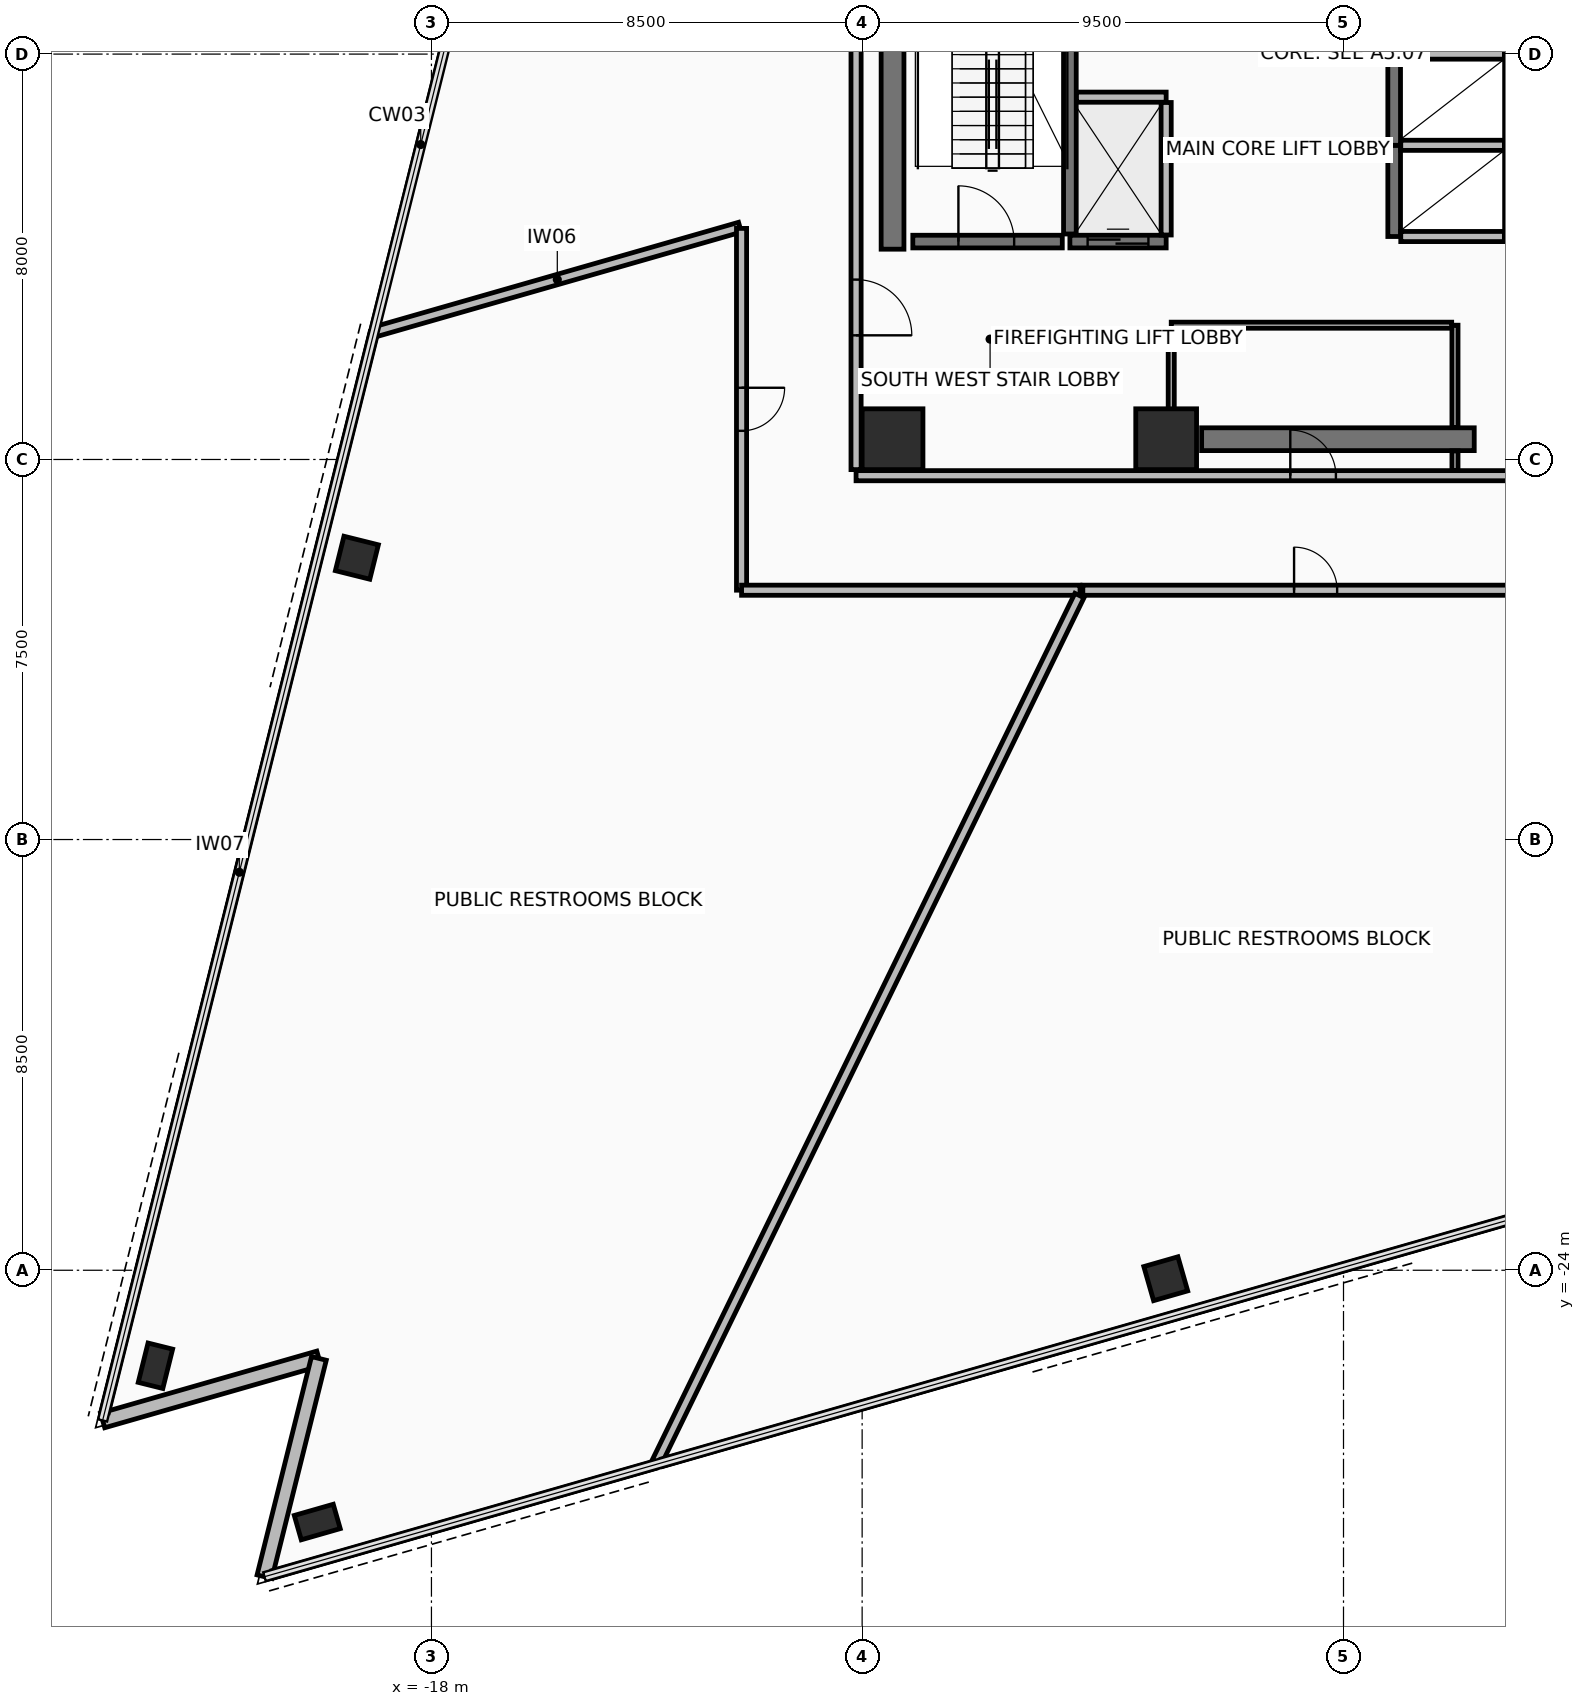
"""IFC4 building model, lengths in metres.
Left out: names, types, materials, properties, quantities, classifications, styles, units other than length and angle.
Written with IfcOpenShell. Run it as: python <this file> out.ifc"""

import sys

from ifc_helpers import new_model, si_unit, direction, frame, frame_2d, origin, origin_2d, place, context, subcontext, project, spatial, rectangle, hollow_rectangle, extrude, element, fill, save


model = new_model("IFC4")
c1 = context("Model", 3, precision=1e-05, world=origin(), true_north=direction((0.0, 1.0)))
c2 = subcontext(c1, "Body", "Model", "MODEL_VIEW")
j1 = project(units=[si_unit("LENGTHUNIT", "METRE"), si_unit("PLANEANGLEUNIT", "RADIAN")], contexts=[c1])
p1 = place(None, origin())
s1 = spatial("IfcSite", under=j1, at=p1, CompositionType="ELEMENT")
p2 = place(p1, origin())
s2 = spatial("IfcBuilding", under=s1, at=p2, CompositionType="ELEMENT")
p3 = place(p2, frame((0.0, 0.0, 86.1)))
s3 = spatial("IfcBuildingStorey", under=s2, at=p3, CompositionType="ELEMENT", Elevation=86.1)
for number, where, z_axis, x_axis in (
    (1, (-8.9, -7.6, 0.0), (0.0, 0.0, 1.0), (1.0, 0.0, 0.0)),
    (2, (-3.5, -7.6, 0.0), (0.0, 0.0, 1.0), (1.0, 0.0, 0.0)),
):
    element("IfcColumn", number, at=place(p3, frame(where, z_axis=z_axis, x_axis=x_axis)), inside=s3, PredefinedType="COLUMN", context=c2, shape_type="SweptSolid", body=[
        extrude(rectangle(XDim=1.2, YDim=1.2, at=origin_2d()), origin(), (0.0, 0.0, 1.0), 3.6),
    ])
p4 = place(p3, frame((-19.472, -9.939, 0.0), z_axis=(0.0, 0.0, 1.0), x_axis=(0.2419218956, 0.970295726276, 0.0)))
e3 = element("IfcColumn", 3, at=p4, inside=s3, PredefinedType="COLUMN", context=c2, shape_type="SweptSolid", body=[
    extrude(hollow_rectangle(XDim=0.7, YDim=0.7, WallThickness=0.04, at=origin_2d()), origin(), (0.0, 0.0, 1.0), 3.6),
])
for number, where, z_axis, x_axis in (
    (4, (-23.447, -25.885, 0.0), (0.0, 0.0, 1.0), (0.242, 0.97, 0.0)),
    (5, (-20.253, -28.969, 0.0), (0.0, 0.0, 1.0), (0.961, 0.276, 0.0)),
):
    element("IfcColumn", number, at=place(p3, frame(where, z_axis=z_axis, x_axis=x_axis)), inside=s3, PredefinedType="COLUMN", context=c2, shape_type="SweptSolid", body=[
        extrude(hollow_rectangle(XDim=0.5, YDim=0.8, WallThickness=0.04, at=origin_2d()), origin(), (0.0, 0.0, 1.0), 3.6),
    ])
p5 = place(p3, frame((-3.508, -24.167, -0.19), z_axis=(0.0, 0.0, 1.0), x_axis=(0.961261695938, 0.275637355817, 0.0)))
e6 = element("IfcColumn", 6, at=p5, inside=s3, PredefinedType="COLUMN", context=c2, shape_type="SweptSolid", body=[
    extrude(hollow_rectangle(XDim=0.7, YDim=0.7, WallThickness=0.04, at=origin_2d()), origin(), (0.0, 0.0, 1.0), 3.79),
])
p6 = place(p3, frame((-24.489, -26.964, 0.0), z_axis=(0.0, 0.0, 1.0), x_axis=(0.961259988927, 0.275643308803, 0.0)))
e7 = element("IfcWall", 7, at=p6, inside=s3, PredefinedType="STANDARD", context=c2, shape_type="SweptSolid", body=[
    extrude(rectangle(XDim=4.44, YDim=0.3, at=frame_2d((2.22, 0.0))), origin(), (0.0, 0.0, 1.0), 2.605),
])
p7 = place(p3, frame((-20.221, -25.74, 0.0), z_axis=(0.0, 0.0, 1.0), x_axis=(-0.241940431812, -0.970291104491, 0.0)))
e8 = element("IfcWall", 8, at=p7, inside=s3, PredefinedType="STANDARD", context=c2, shape_type="SweptSolid", body=[
    extrude(rectangle(XDim=4.44, YDim=0.3, at=frame_2d((2.22, 0.0))), origin(), (0.0, 0.0, 1.0), 2.605),
])
p8 = place(p3, frame((-2.8, -7.6, 0.0), z_axis=(0.0, 0.0, 1.0), x_axis=(1.0, 0.0, 0.0)))
e9 = element("IfcWall", 9, at=p8, inside=s3, PredefinedType="SHEAR", context=c2, shape_type="SweptSolid", body=[
    extrude(rectangle(XDim=5.38, YDim=0.45, at=frame_2d((2.69, 0.0))), origin(), (0.0, 0.0, 1.0), 3.41),
])
p9 = place(p3, frame((-8.9, -3.85, 0.0), z_axis=(0.0, 0.0, 1.0), x_axis=(0.0, 1.0, 0.0)))
e10 = element("IfcWall", 10, at=p9, inside=s3, PredefinedType="SHEAR", context=c2, shape_type="SweptSolid", body=[
    extrude(rectangle(XDim=10.7, YDim=0.45, at=frame_2d((5.35, 0.0))), origin(), (0.0, 0.0, 1.0), 3.41),
])
p10 = place(p3, frame((-9.62, -8.32, 0.0), z_axis=(0.0, 0.0, 1.0), x_axis=(1.0, 0.0, 0.0)))
e11 = element("IfcWall", 11, at=p10, inside=s3, PredefinedType="PARTITIONING", context=c2, shape_type="SweptSolid", body=[
    extrude(rectangle(XDim=19.24, YDim=0.2, at=frame_2d((9.62, 0.0))), origin(), (0.0, 0.0, 1.0), 2.805),
])
p11 = place(p10, frame((8.57, 0.0, 0.0)))
e12 = element("IfcOpeningElement", 12, at=p11, cuts=e11, PredefinedType="OPENING", context=c2, shape_type="SweptSolid", body=[
    extrude(rectangle(XDim=0.9, YDim=2.1, at=frame_2d((0.45, 1.05))), frame((0.0, 0.11, 0.0), z_axis=(0.0, -1.0, 0.0), x_axis=(1.0, 0.0, 0.0)), (0.0, 0.0, 1.0), 0.22),
])
p12 = place(p10, frame((14.045, 0.0, 0.0)))
e13 = element("IfcOpeningElement", 13, at=p12, cuts=e11, PredefinedType="OPENING", context=c2, shape_type="SweptSolid", body=[
    extrude(rectangle(XDim=0.9, YDim=2.1, at=frame_2d((0.45, 1.05))), frame((0.0, 0.11, 0.0), z_axis=(0.0, -1.0, 0.0), x_axis=(1.0, 0.0, 0.0)), (0.0, 0.0, 1.0), 0.22),
])
p13 = place(p10, frame((15.995, 0.0, 0.0)))
e14 = element("IfcOpeningElement", 14, at=p13, cuts=e11, PredefinedType="OPENING", context=c2, shape_type="SweptSolid", body=[
    extrude(rectangle(XDim=0.9, YDim=2.1, at=frame_2d((0.45, 1.05))), frame((0.0, 0.11, 0.0), z_axis=(0.0, -1.0, 0.0), x_axis=(1.0, 0.0, 0.0)), (0.0, 0.0, 1.0), 0.22),
])
p14 = place(p3, frame((-9.62, 8.2, 0.0), z_axis=(0.0, 0.0, 1.0), x_axis=(0.0, -1.0, 0.0)))
e15 = element("IfcWall", 15, at=p14, inside=s3, PredefinedType="PARTITIONING", context=c2, shape_type="SweptSolid", body=[
    extrude(rectangle(XDim=16.4, YDim=0.2, at=frame_2d((8.2, 0.0))), origin(), (0.0, 0.0, 1.0), 2.805),
])
p15 = place(p14, frame((12.65, 0.0, 0.0)))
e16 = element("IfcOpeningElement", 16, at=p15, cuts=e15, PredefinedType="OPENING", context=c2, shape_type="SweptSolid", body=[
    extrude(rectangle(XDim=1.1, YDim=2.15, at=frame_2d((0.55, 1.075))), frame((0.0, 0.11, 0.0), z_axis=(0.0, -1.0, 0.0), x_axis=(1.0, 0.0, 0.0)), (0.0, 0.0, 1.0), 0.22),
])
p16 = place(p3, frame((-5.4, -3.55, 0.0), z_axis=(0.0, 0.0, 1.0), x_axis=(0.0, 1.0, 0.0)))
e17 = element("IfcWall", 17, at=p16, inside=s3, PredefinedType="SHEAR", context=c2, shape_type="SweptSolid", body=[
    extrude(rectangle(XDim=7.3, YDim=0.25, at=frame_2d((3.65, 0.0))), origin(), (0.0, 0.0, 1.0), 3.41),
])
p17 = place(p3, frame((-8.5, -3.7, 0.0), z_axis=(0.0, 0.0, 1.0), x_axis=(1.0, 0.0, 0.0)))
e18 = element("IfcWall", 18, at=p17, inside=s3, PredefinedType="SHEAR", context=c2, shape_type="SweptSolid", body=[
    extrude(rectangle(XDim=2.95, YDim=0.25, at=frame_2d((1.475, 0.0))), origin(), (0.0, 0.0, 1.0), 3.41),
])
p18 = place(p17, frame((0.9, 0.0, 0.0)))
e19 = element("IfcOpeningElement", 19, at=p18, cuts=e18, PredefinedType="OPENING", context=c2, shape_type="SweptSolid", body=[
    extrude(rectangle(XDim=1.1, YDim=2.15, at=frame_2d((0.55, 1.075))), frame((0.0, 0.135, 0.0), z_axis=(0.0, -1.0, 0.0), x_axis=(1.0, 0.0, 0.0)), (0.0, 0.0, 1.0), 0.27),
])
p19 = place(p3, frame((1.0, -3.6, 0.0), z_axis=(0.0, 0.0, 1.0), x_axis=(0.0, 1.0, 0.0)))
e20 = element("IfcWall", 20, at=p19, inside=s3, PredefinedType="SHEAR", context=c2, shape_type="SweptSolid", body=[
    extrude(rectangle(XDim=1.8, YDim=0.25, at=frame_2d((0.9, 0.0))), origin(), (0.0, 0.0, 1.0), 3.41),
])
p20 = place(p3, frame((3.28, -3.6, 0.0), z_axis=(0.0, 0.0, 1.0), x_axis=(0.0, 1.0, 0.0)))
e21 = element("IfcWall", 21, at=p20, inside=s3, PredefinedType="PARTITIONING", context=c2, shape_type="SweptSolid", body=[
    extrude(rectangle(XDim=1.8, YDim=0.2, at=frame_2d((0.9, 0.0))), origin(), (0.0, 0.0, 1.0), 3.41),
])
for number, where, z_axis, x_axis in (
    (22, (1.13, -3.6, 0.0), (0.0, 0.0, 1.0), (1.0, 0.0, 0.0)),
    (23, (1.13, -1.8, 0.0), (0.0, 0.0, 1.0), (1.0, 0.0, 0.0)),
):
    element("IfcWall", number, at=place(p3, frame(where, z_axis=z_axis, x_axis=x_axis)), inside=s3, PredefinedType="PARTITIONING", context=c2, shape_type="SweptSolid", body=[
        extrude(rectangle(XDim=2.045, YDim=0.2, at=frame_2d((1.022, 0.0))), origin(), (0.0, 0.0, 1.0), 3.41),
    ])
p21 = place(p3, frame((1.0, -1.8, 0.0), z_axis=(0.0, 0.0, 1.0), x_axis=(0.0, 1.0, 0.0)))
e24 = element("IfcWall", 24, at=p21, inside=s3, PredefinedType="SHEAR", context=c2, shape_type="SweptSolid", body=[
    extrude(rectangle(XDim=1.8, YDim=0.25, at=frame_2d((0.9, 0.0))), origin(), (0.0, 0.0, 1.0), 3.41),
])
p22 = place(p3, frame((3.28, -1.8, 0.0), z_axis=(0.0, 0.0, 1.0), x_axis=(0.0, 1.0, 0.0)))
e25 = element("IfcWall", 25, at=p22, inside=s3, PredefinedType="PARTITIONING", context=c2, shape_type="SweptSolid", body=[
    extrude(rectangle(XDim=1.8, YDim=0.2, at=frame_2d((0.9, 0.0))), origin(), (0.0, 0.0, 1.0), 3.41),
])
p23 = place(p3, frame((1.13, 0.0, 0.0), z_axis=(0.0, 0.0, 1.0), x_axis=(1.0, 0.0, 0.0)))
e26 = element("IfcWall", 26, at=p23, inside=s3, PredefinedType="PARTITIONING", context=c2, shape_type="SweptSolid", body=[
    extrude(rectangle(XDim=2.045, YDim=0.2, at=frame_2d((1.022, 0.0))), origin(), (0.0, 0.0, 1.0), 3.41),
])
p24 = place(p3, frame((1.0, 0.0, 0.0), z_axis=(0.0, 0.0, 1.0), x_axis=(0.0, 1.0, 0.0)))
e27 = element("IfcWall", 27, at=p24, inside=s3, PredefinedType="SHEAR", context=c2, shape_type="SweptSolid", body=[
    extrude(rectangle(XDim=1.8, YDim=0.25, at=frame_2d((0.9, 0.0))), origin(), (0.0, 0.0, 1.0), 3.41),
])
p25 = place(p3, frame((3.28, 0.0, 0.0), z_axis=(0.0, 0.0, 1.0), x_axis=(0.0, 1.0, 0.0)))
e28 = element("IfcWall", 28, at=p25, inside=s3, PredefinedType="PARTITIONING", context=c2, shape_type="SweptSolid", body=[
    extrude(rectangle(XDim=1.8, YDim=0.2, at=frame_2d((0.9, 0.0))), origin(), (0.0, 0.0, 1.0), 3.41),
])
p26 = place(p3, frame((-5.4, -3.7, 0.0), z_axis=(0.0, 0.0, 1.0), x_axis=(1.0, 0.0, 0.0)))
e29 = element("IfcWall", 29, at=p26, inside=s3, PredefinedType="SHEAR", context=c2, shape_type="SweptSolid", body=[
    extrude(rectangle(XDim=1.9, YDim=0.25, at=frame_2d((0.95, 0.0))), origin(), (0.0, 0.0, 1.0), 3.41),
])
p27 = place(p26, frame((0.35, 0.0, 0.0)))
e30 = element("IfcOpeningElement", 30, at=p27, cuts=e29, PredefinedType="OPENING", context=c2, shape_type="SweptSolid", body=[
    extrude(rectangle(XDim=1.2, YDim=2.2, at=frame_2d((0.6, 1.1))), frame((0.0, 0.135, 0.0), z_axis=(0.0, -1.0, 0.0), x_axis=(1.0, 0.0, 0.0)), (0.0, 0.0, 1.0), 0.27),
])
p28 = place(p3, frame((-5.27, -0.85, 0.0), z_axis=(0.0, 0.0, 1.0), x_axis=(1.0, 0.0, 0.0)))
e31 = element("IfcWall", 31, at=p28, inside=s3, PredefinedType="PARTITIONING", context=c2, shape_type="SweptSolid", body=[
    extrude(rectangle(XDim=1.77, YDim=0.2, at=frame_2d((0.885, 0.0))), origin(), (0.0, 0.0, 1.0), 3.41),
])
p29 = place(p3, frame((-3.5, -3.57, 0.0), z_axis=(0.0, 0.0, 1.0), x_axis=(0.0, 1.0, 0.0)))
e32 = element("IfcWall", 32, at=p29, inside=s3, PredefinedType="PARTITIONING", context=c2, shape_type="SweptSolid", body=[
    extrude(rectangle(XDim=2.615, YDim=0.2, at=frame_2d((1.308, 0.0))), origin(), (0.0, 0.0, 1.0), 3.41),
])
p30 = place(p3, frame((2.2, -8.215, 0.0), z_axis=(0.0, 0.0, 1.0), x_axis=(0.0, 1.0, 0.0)))
e33 = element("IfcWall", 33, at=p30, inside=s3, PredefinedType="PARTITIONING", context=c2, shape_type="SweptSolid", body=[
    extrude(rectangle(XDim=0.385, YDim=0.12, at=frame_2d((0.192, 0.0))), origin(), (0.0, 0.0, 1.0), 2.605),
])
p31 = place(p3, frame((2.2, -7.37, 0.0), z_axis=(0.0, 0.0, 1.0), x_axis=(0.0, 1.0, 0.0)))
e34 = element("IfcWall", 34, at=p31, inside=s3, PredefinedType="PARTITIONING", context=c2, shape_type="SweptSolid", body=[
    extrude(rectangle(XDim=2.02, YDim=0.12, at=frame_2d((1.01, 0.0))), origin(), (0.0, 0.0, 1.0), 2.605),
])
p32 = place(p3, frame((2.135, -5.35, 0.0), z_axis=(0.0, 0.0, 1.0), x_axis=(-1.0, 0.0, 0.0)))
e35 = element("IfcWall", 35, at=p32, inside=s3, PredefinedType="PARTITIONING", context=c2, shape_type="SweptSolid", body=[
    extrude(rectangle(XDim=5.535, YDim=0.12, at=frame_2d((2.768, 0.0))), origin(), (0.0, 0.0, 1.0), 2.605),
])
p33 = place(p3, frame((-3.4, -5.415, 0.0), z_axis=(0.0, 0.0, 1.0), x_axis=(0.0, -1.0, 0.0)))
e36 = element("IfcWall", 36, at=p33, inside=s3, PredefinedType="PARTITIONING", context=c2, shape_type="SweptSolid", body=[
    extrude(rectangle(XDim=2.8, YDim=0.12, at=frame_2d((1.4, 0.0))), origin(), (0.0, 0.0, 1.0), 2.605),
])
p34 = place(p3, frame((-24.446, -26.79, 0.0), z_axis=(0.0, 0.0, 1.0), x_axis=(0.241928161831, 0.970294163908, 0.0)))
e37 = element("IfcWall", 37, at=p34, inside=s3, PredefinedType="PARTITIONING", context=c2, shape_type="SweptSolid", body=[
    extrude(rectangle(XDim=21.941, YDim=0.15, at=frame_2d((10.97, 0.0))), origin(), (0.0, 0.0, 1.0), 3.41),
])
p35 = place(p3, frame((-19.121, -5.483, 0.0), z_axis=(0.0, 0.0, 1.0), x_axis=(0.961259375601, 0.275645447665, 0.0)))
e38 = element("IfcWall", 38, at=p35, inside=s3, PredefinedType="PARTITIONING", context=c2, shape_type="SweptSolid", body=[
    extrude(rectangle(XDim=7.499, YDim=0.2, at=frame_2d((3.75, 0.0))), origin(), (0.0, 0.0, 1.0), 2.605),
])
p36 = place(p3, frame((-11.88, -3.44, 0.0), z_axis=(0.0, 0.0, 1.0), x_axis=(0.0, -1.0, 0.0)))
e39 = element("IfcWall", 39, at=p36, inside=s3, PredefinedType="PARTITIONING", context=c2, shape_type="SweptSolid", body=[
    extrude(rectangle(XDim=7.14, YDim=0.2, at=frame_2d((3.57, 0.0))), origin(), (0.0, 0.0, 1.0), 2.805),
])
p37 = place(p36, frame((3.145, 0.0, 0.0)))
e40 = element("IfcOpeningElement", 40, at=p37, cuts=e39, PredefinedType="OPENING", context=c2, shape_type="SweptSolid", body=[
    extrude(rectangle(XDim=0.85, YDim=2.1, at=frame_2d((0.425, 1.05))), frame((0.0, 0.11, 0.0), z_axis=(0.0, -1.0, 0.0), x_axis=(1.0, 0.0, 0.0)), (0.0, 0.0, 1.0), 0.22),
])
p38 = place(p3, frame((-11.879, -10.58, 0.0), z_axis=(0.0, 0.0, 1.0), x_axis=(1.0, 0.0, 0.0)))
e41 = element("IfcWall", 41, at=p38, inside=s3, PredefinedType="PARTITIONING", context=c2, shape_type="SweptSolid", body=[
    extrude(rectangle(XDim=6.679, YDim=0.2, at=frame_2d((3.34, 0.0))), origin(), (0.0, 0.0, 1.0), 2.805),
])
p39 = place(p3, frame((-5.211, -10.685, 0.0), z_axis=(0.0, 0.0, 1.0), x_axis=(-0.438373182397, -0.898793053464, 0.0)))
e42 = element("IfcWall", 42, at=p39, inside=s3, PredefinedType="PARTITIONING", context=c2, shape_type="SweptSolid", body=[
    extrude(rectangle(XDim=19.069, YDim=0.2, at=frame_2d((9.535, 0.0))), origin(), (0.0, 0.0, 1.0), 2.605),
])
p40 = place(p3, frame((-13.586, -27.837, 0.0), z_axis=(0.0, 0.0, 1.0), x_axis=(-0.961259140901, -0.275646266135, 0.0)))
e43 = element("IfcWall", 43, at=p40, inside=s3, PredefinedType="PARTITIONING", context=c2, shape_type="SweptSolid", body=[
    extrude(rectangle(XDim=7.841, YDim=0.15, at=frame_2d((3.92, 0.0))), origin(), (0.0, 0.0, 1.0), 3.41),
])
p41 = place(p3, frame((-5.145, -10.58, 0.0), z_axis=(0.0, 0.0, 1.0), x_axis=(1.0, 0.0, 0.0)))
e44 = element("IfcWall", 44, at=p41, inside=s3, PredefinedType="PARTITIONING", context=c2, shape_type="SweptSolid", body=[
    extrude(rectangle(XDim=9.189, YDim=0.2, at=frame_2d((4.594, 0.0))), origin(), (0.0, 0.0, 1.0), 2.805),
])
p42 = place(p41, frame((4.169, 0.0, 0.0)))
e45 = element("IfcOpeningElement", 45, at=p42, cuts=e44, PredefinedType="OPENING", context=c2, shape_type="SweptSolid", body=[
    extrude(rectangle(XDim=0.85, YDim=2.1, at=frame_2d((0.425, 1.05))), frame((0.0, 0.11, 0.0), z_axis=(0.0, -1.0, 0.0), x_axis=(1.0, 0.0, 0.0)), (0.0, 0.0, 1.0), 0.22),
])
p43 = place(p3, frame((8.253, -21.575, 0.0), z_axis=(0.0, 0.0, 1.0), x_axis=(-0.961261412197, -0.275638345338, 0.0)))
e46 = element("IfcWall", 46, at=p43, inside=s3, PredefinedType="PARTITIONING", context=c2, shape_type="SweptSolid", body=[
    extrude(rectangle(XDim=22.567, YDim=0.15, at=frame_2d((11.283, 0.0))), origin(), (0.0, 0.0, 1.0), 3.41),
])
p44 = place(p15, frame((1.1, 0.0, 0.0), z_axis=(0.0, 0.0, 1.0), x_axis=(-1.0, 0.0, 0.0)))
e47 = element("IfcDoor", 47, at=p44, inside=s3, OperationType="SINGLE_SWING_LEFT", PredefinedType="DOOR", context=c2, shape_type="SweptSolid", body=[
    extrude(rectangle(XDim=1.1, YDim=2.15, at=frame_2d((0.55, 1.075))), frame((0.0, 0.025, 0.0), z_axis=(0.0, -1.0, 0.0), x_axis=(1.0, 0.0, 0.0)), (0.0, 0.0, 1.0), 0.05),
])
fill(e16, e47)
p45 = place(p18, origin())
e48 = element("IfcDoor", 48, at=p45, inside=s3, OperationType="SINGLE_SWING_LEFT", PredefinedType="DOOR", context=c2, shape_type="SweptSolid", body=[
    extrude(rectangle(XDim=1.1, YDim=2.15, at=frame_2d((0.55, 1.075))), frame((0.0, 0.025, 0.0), z_axis=(0.0, -1.0, 0.0), x_axis=(1.0, 0.0, 0.0)), (0.0, 0.0, 1.0), 0.05),
])
fill(e19, e48)
p46 = place(p27, origin())
e49 = element("IfcDoor", 49, at=p46, inside=s3, OperationType="SLIDING_TO_RIGHT", PredefinedType="DOOR", context=c2, shape_type="SweptSolid", body=[
    extrude(rectangle(XDim=1.2, YDim=2.2, at=frame_2d((0.6, 1.1))), frame((0.0, 0.025, 0.0), z_axis=(0.0, -1.0, 0.0), x_axis=(1.0, 0.0, 0.0)), (0.0, 0.0, 1.0), 0.05),
])
fill(e30, e49)
p47 = place(p11, origin())
e50 = element("IfcDoor", 50, at=p47, inside=s3, OperationType="SINGLE_SWING_LEFT", PredefinedType="DOOR", context=c2, shape_type="SweptSolid", body=[
    extrude(rectangle(XDim=0.9, YDim=2.1, at=frame_2d((0.45, 1.05))), frame((0.0, 0.025, 0.0), z_axis=(0.0, -1.0, 0.0), x_axis=(1.0, 0.0, 0.0)), (0.0, 0.0, 1.0), 0.05),
])
fill(e12, e50)
p48 = place(p37, origin())
e51 = element("IfcDoor", 51, at=p48, inside=s3, OperationType="SINGLE_SWING_RIGHT", PredefinedType="DOOR", context=c2, shape_type="SweptSolid", body=[
    extrude(rectangle(XDim=0.85, YDim=2.1, at=frame_2d((0.425, 1.05))), frame((0.0, 0.025, 0.0), z_axis=(0.0, -1.0, 0.0), x_axis=(1.0, 0.0, 0.0)), (0.0, 0.0, 1.0), 0.05),
])
fill(e40, e51)
p49 = place(p42, origin())
e52 = element("IfcDoor", 52, at=p49, inside=s3, OperationType="SINGLE_SWING_RIGHT", PredefinedType="DOOR", context=c2, shape_type="SweptSolid", body=[
    extrude(rectangle(XDim=0.85, YDim=2.1, at=frame_2d((0.425, 1.05))), frame((0.0, 0.025, 0.0), z_axis=(0.0, -1.0, 0.0), x_axis=(1.0, 0.0, 0.0)), (0.0, 0.0, 1.0), 0.05),
])
fill(e45, e52)
save(model, sys.argv[1])
